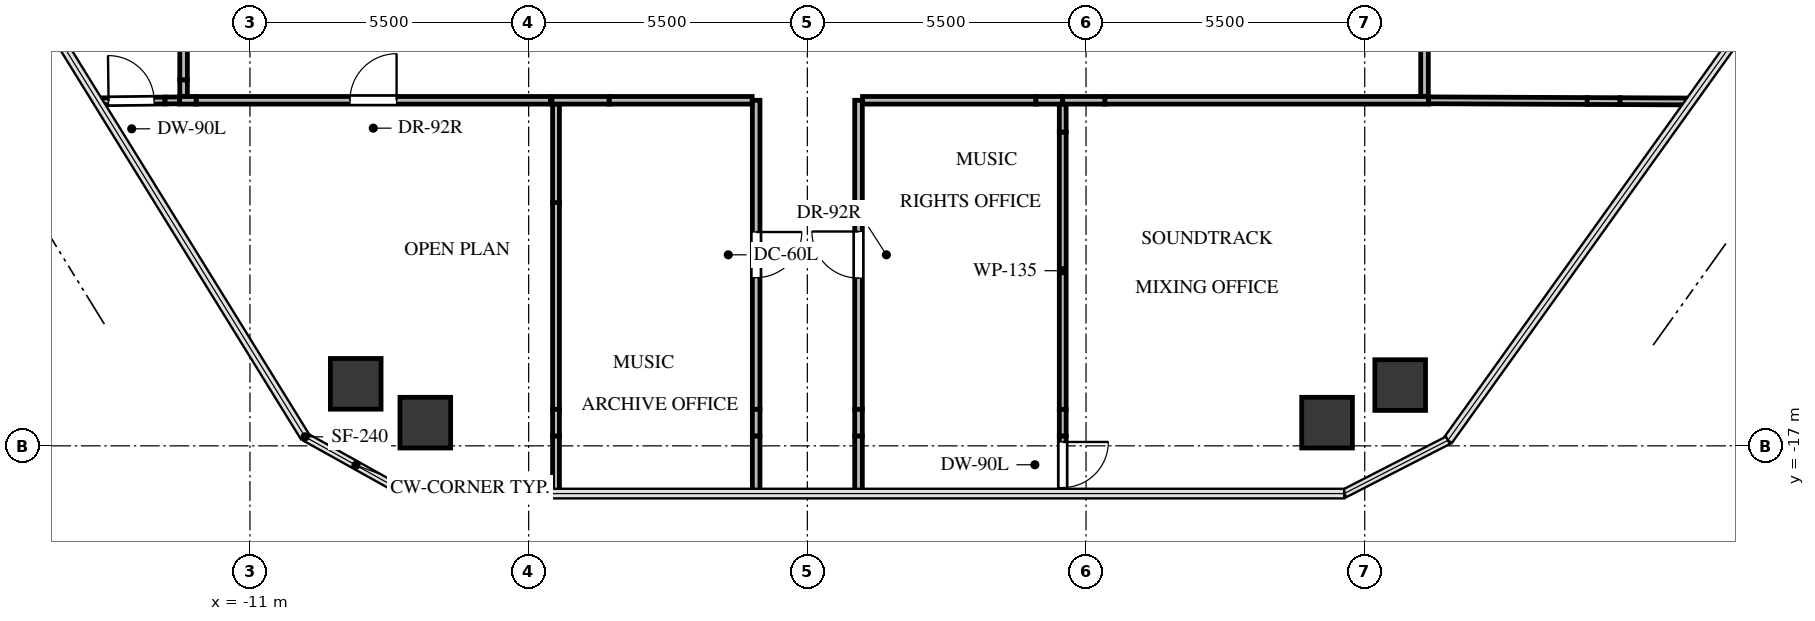
"""IFC4 building model, lengths in metres.
Left out: names, types, materials, properties, quantities, classifications, styles, units other than length and angle.
Written with IfcOpenShell. Run it as: python <this file> out.ifc"""

import sys

from ifc_helpers import new_model, si_unit, direction, frame, frame_2d, origin, origin_2d, place, context, subcontext, project, spatial, rectangle, extrude, source, transform, mapped, element, fill, save


model = new_model("IFC4")
c1 = context("Model", 3, precision=1e-05, world=origin(), true_north=direction((0.0, 1.0)))
c2 = subcontext(c1, "Body", "Model", "MODEL_VIEW")
j1 = project(units=[si_unit("LENGTHUNIT", "METRE"), si_unit("PLANEANGLEUNIT", "RADIAN")], contexts=[c1])
p1 = place(None, origin())
s1 = spatial("IfcSite", under=j1, at=p1, CompositionType="ELEMENT")
p2 = place(p1, origin())
s2 = spatial("IfcBuilding", under=s1, at=p2, CompositionType="ELEMENT")
p3 = place(p2, frame((0.0, 0.0, 206.2)))
s3 = spatial("IfcBuildingStorey", under=s2, at=p3, CompositionType="ELEMENT", Elevation=206.2)
m1 = source(origin(), c2, "Body", "SweptSolid", [
    extrude(rectangle(XDim=1.0, YDim=1.0, at=origin_2d()), origin(), (0.0, 0.0, 1.0), 3.0),
])
for number, where, z_axis, x_axis in (
    (1, (-8.913, -15.776, -0.24), (0.0, 0.0, 1.0), (1.0, 0.0, 0.0)),
    (2, (11.7, -15.8, -0.24), (0.0, 0.0, 1.0), (1.0, 0.0, 0.0)),
    (3, (10.257, -16.542, -0.24), (0.0, 0.0, 1.0), (1.0, 0.0, 0.0)),
    (4, (-7.54, -16.542, -0.24), (0.0, 0.0, 1.0), (1.0, 0.0, 0.0)),
):
    element("IfcColumn", number, at=place(p3, frame(where, z_axis=z_axis, x_axis=x_axis)), inside=s3, PredefinedType="COLUMN", context=c2, shape_type="MappedRepresentation", body=[
        mapped(m1, transform((0.0, 0.0, 0.0), x_axis=(1.0, 0.0, 0.0), y_axis=(0.0, 1.0, 0.0), z_axis=(0.0, 0.0, 1.0), scale=1.0)),
    ])
p4 = place(p3, frame((-12.062, -10.18, 0.0), z_axis=(0.0, 0.0, 1.0), x_axis=(1.0, 0.0, 0.0)))
e5 = element("IfcWall", 5, at=p4, inside=s3, PredefinedType="PARTITIONING", context=c2, shape_type="SweptSolid", body=[
    extrude(rectangle(XDim=6.992, YDim=0.15, at=frame_2d((3.496, 0.0))), origin(), (0.0, 0.0, 1.0), 2.745),
])
p5 = place(p4, frame((3.036, 0.0, 0.0)))
e6 = element("IfcOpeningElement", 6, at=p5, cuts=e5, PredefinedType="OPENING", context=c2, shape_type="SweptSolid", body=[
    extrude(rectangle(XDim=0.92, YDim=2.1, at=frame_2d((0.46, 1.05))), frame((0.0, 0.085, 0.0), z_axis=(0.0, -1.0, 0.0), x_axis=(1.0, 0.0, 0.0)), (0.0, 0.0, 1.0), 0.17),
])
p6 = place(p3, frame((-12.39, -10.18, 0.0), z_axis=(0.0, 0.0, 1.0), x_axis=(1.0, 0.0, 0.0)))
e7 = element("IfcWall", 7, at=p6, inside=s3, PredefinedType="PARTITIONING", context=c2, shape_type="SweptSolid", body=[
    extrude(rectangle(XDim=0.327, YDim=0.15, at=frame_2d((0.164, 0.0))), origin(), (0.0, 0.0, 1.0), 2.099),
])
p7 = place(p3, frame((-1.01, -10.18, 0.0), z_axis=(0.0, 0.0, 1.0), x_axis=(0.0, -1.0, 0.0)))
e8 = element("IfcWall", 8, at=p7, inside=s3, PredefinedType="PARTITIONING", context=c2, shape_type="SweptSolid", body=[
    extrude(rectangle(XDim=6.1, YDim=0.15, at=frame_2d((3.05, 0.0))), origin(), (0.0, 0.0, 1.0), 2.745),
])
p8 = place(p7, frame((2.6, 0.0, 0.0)))
e9 = element("IfcOpeningElement", 9, at=p8, cuts=e8, PredefinedType="OPENING", context=c2, shape_type="SweptSolid", body=[
    extrude(rectangle(XDim=0.9, YDim=2.05, at=frame_2d((0.45, 1.025))), frame((0.0, 0.085, 0.0), z_axis=(0.0, -1.0, 0.0), x_axis=(1.0, 0.0, 0.0)), (0.0, 0.0, 1.0), 0.17),
])
p9 = place(p3, frame((-1.01, -16.804, 0.0), z_axis=(0.0, 0.0, 1.0), x_axis=(0.0, -1.0, 0.0)))
e10 = element("IfcWall", 10, at=p9, inside=s3, PredefinedType="PARTITIONING", context=c2, shape_type="SweptSolid", body=[
    extrude(rectangle(XDim=1.137, YDim=0.15, at=frame_2d((0.569, 0.0))), origin(), (0.0, 0.0, 1.0), 2.745),
])
p10 = place(p3, frame((-1.01, -16.28, 0.0), z_axis=(0.0, 0.0, 1.0), x_axis=(0.0, -1.0, 0.0)))
e11 = element("IfcWall", 11, at=p10, inside=s3, PredefinedType="PARTITIONING", context=c2, shape_type="SweptSolid", body=[
    extrude(rectangle(XDim=0.525, YDim=0.15, at=frame_2d((0.262, 0.0))), origin(), (0.0, 0.0, 1.0), 2.099),
])
p11 = place(p3, frame((-3.913, -10.18, 0.0), z_axis=(0.0, 0.0, 1.0), x_axis=(1.0, 0.0, 0.0)))
e12 = element("IfcWall", 12, at=p11, inside=s3, PredefinedType="PARTITIONING", context=c2, shape_type="SweptSolid", body=[
    extrude(rectangle(XDim=2.824, YDim=0.15, at=frame_2d((1.412, 0.0))), origin(), (0.0, 0.0, 1.0), 2.745),
])
p12 = place(p3, frame((-5.04, -10.18, 0.0), z_axis=(0.0, 0.0, 1.0), x_axis=(1.0, 0.0, 0.0)))
e13 = element("IfcWall", 13, at=p12, inside=s3, PredefinedType="PARTITIONING", context=c2, shape_type="SweptSolid", body=[
    extrude(rectangle(XDim=1.127, YDim=0.15, at=frame_2d((0.563, 0.0))), origin(), (0.0, 0.0, 1.0), 1.942),
])
p13 = place(p3, frame((1.01, -17.942, 0.0), z_axis=(0.0, 0.0, 1.0), x_axis=(0.0, 1.0, 0.0)))
e14 = element("IfcWall", 14, at=p13, inside=s3, PredefinedType="PARTITIONING", context=c2, shape_type="SweptSolid", body=[
    extrude(rectangle(XDim=1.137, YDim=0.15, at=frame_2d((0.569, 0.0))), origin(), (0.0, 0.0, 1.0), 2.745),
])
p14 = place(p3, frame((1.01, -16.28, 0.0), z_axis=(0.0, 0.0, 1.0), x_axis=(0.0, 1.0, 0.0)))
e15 = element("IfcWall", 15, at=p14, inside=s3, PredefinedType="PARTITIONING", context=c2, shape_type="SweptSolid", body=[
    extrude(rectangle(XDim=6.1, YDim=0.15, at=frame_2d((3.05, 0.0))), origin(), (0.0, 0.0, 1.0), 2.745),
])
p15 = place(p14, frame((2.59, 0.0, 0.0)))
e16 = element("IfcOpeningElement", 16, at=p15, cuts=e15, PredefinedType="OPENING", context=c2, shape_type="SweptSolid", body=[
    extrude(rectangle(XDim=0.92, YDim=2.1, at=frame_2d((0.46, 1.05))), frame((0.0, 0.085, 0.0), z_axis=(0.0, -1.0, 0.0), x_axis=(1.0, 0.0, 0.0)), (0.0, 0.0, 1.0), 0.17),
])
p16 = place(p3, frame((1.01, -16.804, 0.0), z_axis=(0.0, 0.0, 1.0), x_axis=(0.0, 1.0, 0.0)))
e17 = element("IfcWall", 17, at=p16, inside=s3, PredefinedType="PARTITIONING", context=c2, shape_type="SweptSolid", body=[
    extrude(rectangle(XDim=0.525, YDim=0.15, at=frame_2d((0.262, 0.0))), origin(), (0.0, 0.0, 1.0), 2.099),
])
p17 = place(p3, frame((1.089, -10.18, 0.0), z_axis=(0.0, 0.0, 1.0), x_axis=(1.0, 0.0, 0.0)))
e18 = element("IfcWall", 18, at=p17, inside=s3, PredefinedType="PARTITIONING", context=c2, shape_type="SweptSolid", body=[
    extrude(rectangle(XDim=3.422, YDim=0.15, at=frame_2d((1.711, 0.0))), origin(), (0.0, 0.0, 1.0), 1.942),
])
p18 = place(p3, frame((4.511, -10.18, 0.0), z_axis=(0.0, 0.0, 1.0), x_axis=(1.0, 0.0, 0.0)))
e19 = element("IfcWall", 19, at=p18, inside=s3, PredefinedType="PARTITIONING", context=c2, shape_type="SweptSolid", body=[
    extrude(rectangle(XDim=0.529, YDim=0.15, at=frame_2d((0.264, 0.0))), origin(), (0.0, 0.0, 1.0), 1.942),
])
p19 = place(p3, frame((5.87, -10.18, 0.0), z_axis=(0.0, 0.0, 1.0), x_axis=(1.0, 0.0, 0.0)))
e20 = element("IfcWall", 20, at=p19, inside=s3, PredefinedType="PARTITIONING", context=c2, shape_type="SweptSolid", body=[
    extrude(rectangle(XDim=6.39, YDim=0.15, at=frame_2d((3.195, 0.0))), origin(), (0.0, 0.0, 1.0), 1.942),
])
p20 = place(p3, frame((5.04, -10.18, 0.0), z_axis=(0.0, 0.0, 1.0), x_axis=(1.0, 0.0, 0.0)))
e21 = element("IfcWall", 21, at=p20, inside=s3, PredefinedType="PARTITIONING", context=c2, shape_type="SweptSolid", body=[
    extrude(rectangle(XDim=0.83, YDim=0.15, at=frame_2d((0.415, 0.0))), origin(), (0.0, 0.0, 1.0), 1.942),
])
p21 = place(p3, frame((-12.31, -8.919, 0.0), z_axis=(0.0, 0.0, 1.0), x_axis=(0.0, -1.0, 0.0)))
e22 = element("IfcWall", 22, at=p21, inside=s3, PredefinedType="PARTITIONING", context=c2, shape_type="SweptSolid", body=[
    extrude(rectangle(XDim=0.86, YDim=0.15, at=frame_2d((0.43, 0.0))), origin(), (0.0, 0.0, 1.0), 2.099),
])
p22 = place(p3, frame((-12.31, -9.779, 0.0), z_axis=(0.0, 0.0, 1.0), x_axis=(0.0, -1.0, 0.0)))
e23 = element("IfcWall", 23, at=p22, inside=s3, PredefinedType="PARTITIONING", context=c2, shape_type="SweptSolid", body=[
    extrude(rectangle(XDim=0.322, YDim=0.15, at=frame_2d((0.161, 0.0))), origin(), (0.0, 0.0, 1.0), 2.099),
])
p23 = place(p3, frame((12.18, -10.101, 0.0), z_axis=(0.0, 0.0, 1.0), x_axis=(0.0, 1.0, 0.0)))
e24 = element("IfcWall", 24, at=p23, inside=s3, PredefinedType="PARTITIONING", context=c2, shape_type="SweptSolid", body=[
    extrude(rectangle(XDim=1.661, YDim=0.15, at=frame_2d((0.831, 0.0))), origin(), (0.0, 0.0, 1.0), 2.745),
])
p24 = place(p3, frame((-4.96, -12.199, 0.0), z_axis=(0.0, 0.0, 1.0), x_axis=(0.0, -1.0, 0.0)))
e25 = element("IfcWall", 25, at=p24, inside=s3, PredefinedType="PARTITIONING", context=c2, shape_type="SweptSolid", body=[
    extrude(rectangle(XDim=4.081, YDim=0.135, at=frame_2d((2.04, 0.0))), origin(), (0.0, 0.0, 1.0), 1.942),
])
p25 = place(p3, frame((-4.96, -16.804, 0.0), z_axis=(0.0, 0.0, 1.0), x_axis=(0.0, -1.0, 0.0)))
e26 = element("IfcWall", 26, at=p25, inside=s3, PredefinedType="PARTITIONING", context=c2, shape_type="SweptSolid", body=[
    extrude(rectangle(XDim=1.137, YDim=0.135, at=frame_2d((0.569, 0.0))), origin(), (0.0, 0.0, 1.0), 2.745),
])
p26 = place(p3, frame((-4.96, -10.259, 0.0), z_axis=(0.0, 0.0, 1.0), x_axis=(0.0, -1.0, 0.0)))
e27 = element("IfcWall", 27, at=p26, inside=s3, PredefinedType="PARTITIONING", context=c2, shape_type="SweptSolid", body=[
    extrude(rectangle(XDim=1.94, YDim=0.135, at=frame_2d((0.97, 0.0))), origin(), (0.0, 0.0, 1.0), 1.942),
])
p27 = place(p3, frame((-4.96, -16.28, 0.0), z_axis=(0.0, 0.0, 1.0), x_axis=(0.0, -1.0, 0.0)))
e28 = element("IfcWall", 28, at=p27, inside=s3, PredefinedType="PARTITIONING", context=c2, shape_type="SweptSolid", body=[
    extrude(rectangle(XDim=0.525, YDim=0.135, at=frame_2d((0.262, 0.0))), origin(), (0.0, 0.0, 1.0), 2.099),
])
p28 = place(p3, frame((-14.004, -10.201, 0.0), z_axis=(0.0, 0.0, 1.0), x_axis=(0.999924024946, 0.012326570317, 0.0)))
e29 = element("IfcWall", 29, at=p28, inside=s3, PredefinedType="PARTITIONING", context=c2, shape_type="SweptSolid", body=[
    extrude(rectangle(XDim=1.327, YDim=0.135, at=frame_2d((0.664, 0.0))), origin(), (0.0, 0.0, 1.0), 2.745),
])
p29 = place(p28, frame((0.214, 0.0, 0.0)))
e30 = element("IfcOpeningElement", 30, at=p29, cuts=e29, PredefinedType="OPENING", context=c2, shape_type="SweptSolid", body=[
    extrude(rectangle(XDim=0.9, YDim=2.05, at=frame_2d((0.45, 1.025))), frame((0.0, 0.078, 0.0), z_axis=(0.0, -1.0, 0.0), x_axis=(1.0, 0.0, 0.0)), (0.0, 0.0, 1.0), 0.155),
])
p30 = place(p3, frame((-12.677, -10.185, 0.0), z_axis=(0.0, 0.0, 1.0), x_axis=(0.99991866361, 0.012754064587, 0.0)))
e31 = element("IfcWall", 31, at=p30, inside=s3, PredefinedType="PARTITIONING", context=c2, shape_type="SweptSolid", body=[
    extrude(rectangle(XDim=0.287, YDim=0.135, at=frame_2d((0.144, 0.0))), origin(), (0.0, 0.0, 1.0), 2.099),
])
p31 = place(p3, frame((5.04, -10.807, 0.0), z_axis=(0.0, 0.0, 1.0), x_axis=(0.0, -1.0, 0.0)))
e32 = element("IfcWall", 32, at=p31, inside=s3, PredefinedType="PARTITIONING", context=c2, shape_type="SweptSolid", body=[
    extrude(rectangle(XDim=5.473, YDim=0.135, at=frame_2d((2.736, 0.0))), origin(), (0.0, 0.0, 1.0), 1.942),
])
p32 = place(p3, frame((5.04, -16.804, 0.0), z_axis=(0.0, 0.0, 1.0), x_axis=(0.0, -1.0, 0.0)))
e33 = element("IfcWall", 33, at=p32, inside=s3, PredefinedType="PARTITIONING", context=c2, shape_type="SweptSolid", body=[
    extrude(rectangle(XDim=1.137, YDim=0.135, at=frame_2d((0.569, 0.0))), origin(), (0.0, 0.0, 1.0), 2.745),
])
p33 = place(p32, frame((0.119, 0.0, 0.0)))
e34 = element("IfcOpeningElement", 34, at=p33, cuts=e33, PredefinedType="OPENING", context=c2, shape_type="SweptSolid", body=[
    extrude(rectangle(XDim=0.9, YDim=2.05, at=frame_2d((0.45, 1.025))), frame((0.0, 0.078, 0.0), z_axis=(0.0, -1.0, 0.0), x_axis=(1.0, 0.0, 0.0)), (0.0, 0.0, 1.0), 0.155),
])
p34 = place(p3, frame((5.04, -10.259, 0.0), z_axis=(0.0, 0.0, 1.0), x_axis=(0.0, -1.0, 0.0)))
e35 = element("IfcWall", 35, at=p34, inside=s3, PredefinedType="PARTITIONING", context=c2, shape_type="SweptSolid", body=[
    extrude(rectangle(XDim=0.548, YDim=0.135, at=frame_2d((0.274, 0.0))), origin(), (0.0, 0.0, 1.0), 1.942),
])
p35 = place(p3, frame((5.04, -16.28, 0.0), z_axis=(0.0, 0.0, 1.0), x_axis=(0.0, -1.0, 0.0)))
e36 = element("IfcWall", 36, at=p35, inside=s3, PredefinedType="PARTITIONING", context=c2, shape_type="SweptSolid", body=[
    extrude(rectangle(XDim=0.525, YDim=0.135, at=frame_2d((0.262, 0.0))), origin(), (0.0, 0.0, 1.0), 2.099),
])
p36 = place(p3, frame((12.26, -10.18, 0.0), z_axis=(0.0, 0.0, 1.0), x_axis=(0.999990120522, -0.004445093728, 0.0)))
e37 = element("IfcWall", 37, at=p36, inside=s3, PredefinedType="PARTITIONING", context=c2, shape_type="SweptSolid", body=[
    extrude(rectangle(XDim=3.131, YDim=0.135, at=frame_2d((1.565, 0.0))), origin(), (0.0, 0.0, 1.0), 2.745),
])
p37 = place(p3, frame((16.034, -10.197, 0.0), z_axis=(0.0, 0.0, 1.0), x_axis=(0.999989640625, -0.004551773574, 0.0)))
e38 = element("IfcWall", 38, at=p37, inside=s3, PredefinedType="PARTITIONING", context=c2, shape_type="SweptSolid", body=[
    extrude(rectangle(XDim=1.395, YDim=0.135, at=frame_2d((0.697, 0.0))), origin(), (0.0, 0.0, 1.0), 2.745),
])
p38 = place(p3, frame((15.391, -10.194, 0.0), z_axis=(0.0, 0.0, 1.0), x_axis=(0.999991299796, -0.00417137061, 0.0)))
e39 = element("IfcWall", 39, at=p38, inside=s3, PredefinedType="PARTITIONING", context=c2, shape_type="SweptSolid", body=[
    extrude(rectangle(XDim=0.644, YDim=0.135, at=frame_2d((0.322, 0.0))), origin(), (0.0, 0.0, 1.0), 2.099),
])
m2 = source(origin(), c2, "Body", "SweptSolid", [
    extrude(rectangle(XDim=0.92, YDim=2.1, at=frame_2d((0.46, 1.05))), frame((0.0, 0.025, 0.0), z_axis=(0.0, -1.0, 0.0), x_axis=(1.0, 0.0, 0.0)), (0.0, 0.0, 1.0), 0.05),
])
p39 = place(p5, origin())
e40 = element("IfcDoor", 40, at=p39, inside=s3, OperationType="SINGLE_SWING_RIGHT", PredefinedType="DOOR", context=c2, shape_type="MappedRepresentation", body=[
    mapped(m2, transform((0.0, 0.0, 0.0), x_axis=(1.0, 0.0, 0.0), y_axis=(0.0, 1.0, 0.0), z_axis=(0.0, 0.0, 1.0), scale=1.0)),
])
fill(e6, e40)
m3 = source(origin(), c2, "Body", "SweptSolid", [
    extrude(rectangle(XDim=0.9, YDim=2.05, at=frame_2d((0.45, 1.025))), frame((0.0, 0.025, 0.0), z_axis=(0.0, -1.0, 0.0), x_axis=(1.0, 0.0, 0.0)), (0.0, 0.0, 1.0), 0.05),
])
p40 = place(p8, origin())
e41 = element("IfcDoor", 41, at=p40, inside=s3, OperationType="SINGLE_SWING_LEFT", PredefinedType="DOOR", context=c2, shape_type="MappedRepresentation", body=[
    mapped(m3, transform((0.0, 0.0, 0.0), x_axis=(1.0, 0.0, 0.0), y_axis=(0.0, 1.0, 0.0), z_axis=(0.0, 0.0, 1.0), scale=1.0)),
])
fill(e9, e41)
p41 = place(p15, origin())
e42 = element("IfcDoor", 42, at=p41, inside=s3, OperationType="SINGLE_SWING_RIGHT", PredefinedType="DOOR", context=c2, shape_type="MappedRepresentation", body=[
    mapped(m2, transform((0.0, 0.0, 0.0), x_axis=(1.0, 0.0, 0.0), y_axis=(0.0, 1.0, 0.0), z_axis=(0.0, 0.0, 1.0), scale=1.0)),
])
fill(e16, e42)
m4 = source(origin(), c2, "Body", "SweptSolid", [
    extrude(rectangle(XDim=0.9, YDim=2.05, at=frame_2d((0.45, 1.025))), frame((0.0, 0.025, 0.0), z_axis=(0.0, -1.0, 0.0), x_axis=(1.0, 0.0, 0.0)), (0.0, 0.0, 1.0), 0.05),
])
p42 = place(p29, origin())
e43 = element("IfcDoor", 43, at=p42, inside=s3, OperationType="SINGLE_SWING_LEFT", PredefinedType="DOOR", context=c2, shape_type="MappedRepresentation", body=[
    mapped(m4, transform((0.0, 0.0, 0.0), x_axis=(1.0, 0.0, 0.0), y_axis=(0.0, 1.0, 0.0), z_axis=(0.0, 0.0, 1.0), scale=1.0)),
])
fill(e30, e43)
p43 = place(p33, origin())
e44 = element("IfcDoor", 44, at=p43, inside=s3, OperationType="SINGLE_SWING_LEFT", PredefinedType="DOOR", context=c2, shape_type="MappedRepresentation", body=[
    mapped(m4, transform((0.0, 0.0, 0.0), x_axis=(1.0, 0.0, 0.0), y_axis=(0.0, 1.0, 0.0), z_axis=(0.0, 0.0, 1.0), scale=1.0)),
])
fill(e34, e44)
save(model, sys.argv[1])
